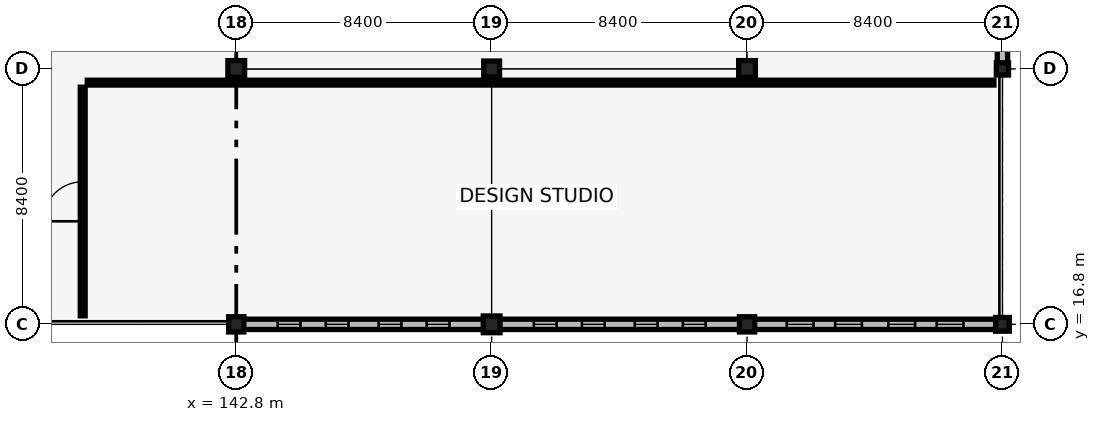
"""IFC4 building model, lengths in metres.
Left out: names, types, materials, properties, quantities, classifications, styles, units other than length and angle.
Written with IfcOpenShell. Run it as: python <this file> out.ifc"""

import sys

from ifc_helpers import new_model, si_unit, direction, frame, frame_2d, origin, origin_2d, place, context, subcontext, project, spatial, rectangle, extrude, element, fill, save


model = new_model("IFC4")
c1 = context("Model", 3, precision=1e-05, world=origin(), true_north=direction((0.0, 1.0)))
c2 = subcontext(c1, "Body", "Model", "MODEL_VIEW")
j1 = project(units=[si_unit("LENGTHUNIT", "METRE"), si_unit("PLANEANGLEUNIT", "RADIAN")], contexts=[c1])
p1 = place(None, origin())
s1 = spatial("IfcSite", under=j1, at=p1, CompositionType="ELEMENT")
p2 = place(p1, origin())
s2 = spatial("IfcBuilding", under=s1, at=p2, CompositionType="ELEMENT")
p3 = place(p2, frame((0.0, 0.0, 22.1)))
s3 = spatial("IfcBuildingStorey", under=s2, at=p3, CompositionType="ELEMENT", Elevation=22.1)
p4 = place(p3, frame((142.8, 16.8, 0.0), z_axis=(0.0, 0.0, 1.0), x_axis=(1.0, 0.0, 0.0)))
e1 = element("IfcColumn", 1, at=p4, inside=s3, PredefinedType="COLUMN", context=c2, shape_type="SweptSolid", body=[
    extrude(rectangle(XDim=0.5, YDim=0.5, at=origin_2d()), origin(), (0.0, 0.0, 1.0), 3.78),
])
for number, where, z_axis, x_axis in (
    (2, (142.8, 25.2, 0.0), (0.0, 0.0, 1.0), (1.0, 0.0, 0.0)),
    (3, (151.2, 16.8, 0.0), (0.0, 0.0, 1.0), (1.0, 0.0, 0.0)),
):
    element("IfcColumn", number, at=place(p3, frame(where, z_axis=z_axis, x_axis=x_axis)), inside=s3, PredefinedType="COLUMN", context=c2, shape_type="SweptSolid", body=[
        extrude(rectangle(XDim=0.55, YDim=0.55, at=origin_2d()), origin(), (0.0, 0.0, 1.0), 3.78),
    ])
p5 = place(p3, frame((151.2, 25.2, 0.0), z_axis=(0.0, 0.0, 1.0), x_axis=(1.0, 0.0, 0.0)))
e4 = element("IfcColumn", 4, at=p5, inside=s3, PredefinedType="COLUMN", context=c2, shape_type="SweptSolid", body=[
    extrude(rectangle(XDim=0.52, YDim=0.52, at=origin_2d()), origin(), (0.0, 0.0, 1.0), 3.78),
])
p6 = place(p3, frame((159.6, 16.8, 0.0), z_axis=(0.0, 0.0, 1.0), x_axis=(1.0, 0.0, 0.0)))
e5 = element("IfcColumn", 5, at=p6, inside=s3, PredefinedType="COLUMN", context=c2, shape_type="SweptSolid", body=[
    extrude(rectangle(XDim=0.5, YDim=0.5, at=origin_2d()), origin(), (0.0, 0.0, 1.0), 3.78),
])
p7 = place(p3, frame((159.6, 25.2, 0.0), z_axis=(0.0, 0.0, 1.0), x_axis=(1.0, 0.0, 0.0)))
e6 = element("IfcColumn", 6, at=p7, inside=s3, PredefinedType="COLUMN", context=c2, shape_type="SweptSolid", body=[
    extrude(rectangle(XDim=0.55, YDim=0.55, at=origin_2d()), origin(), (0.0, 0.0, 1.0), 3.78),
])
p8 = place(p3, frame((168.0, 16.8, 0.0), z_axis=(0.0, 0.0, 1.0), x_axis=(1.0, 0.0, 0.0)))
e7 = element("IfcColumn", 7, at=p8, inside=s3, PredefinedType="COLUMN", context=c2, shape_type="SweptSolid", body=[
    extrude(rectangle(XDim=0.45, YDim=0.45, at=origin_2d()), origin(), (0.0, 0.0, 1.0), 3.78),
])
p9 = place(p3, frame((168.0, 25.2, 0.0), z_axis=(0.0, 0.0, 1.0), x_axis=(1.0, 0.0, 0.0)))
e8 = element("IfcColumn", 8, at=p9, inside=s3, PredefinedType="COLUMN", context=c2, shape_type="SweptSolid", body=[
    extrude(rectangle(XDim=0.4, YDim=0.4, at=origin_2d()), origin(), (0.0, 0.0, 1.0), 3.78),
])
p10 = place(p3, frame((143.035, 16.8, 0.0), z_axis=(0.0, 0.0, 1.0), x_axis=(1.0, 0.0, 0.0)))
e9 = element("IfcWall", 9, at=p10, inside=s3, PredefinedType="SOLIDWALL", context=c2, shape_type="SweptSolid", body=[
    extrude(rectangle(XDim=7.905, YDim=0.34, at=frame_2d((3.953, 0.0))), origin(), (0.0, 0.0, 1.0), 3.18),
])
p11 = place(p10, frame((1.127, 0.0, 0.7)))
e10 = element("IfcOpeningElement", 10, at=p11, cuts=e9, PredefinedType="OPENING", context=c2, shape_type="SweptSolid", body=[
    extrude(rectangle(XDim=0.75, YDim=2.1, at=frame_2d((0.375, 1.05))), frame((0.0, 0.18, 0.0), z_axis=(0.0, -1.0, 0.0), x_axis=(1.0, 0.0, 0.0)), (0.0, 0.0, 1.0), 0.36),
])
p12 = place(p10, frame((2.708, 0.0, 0.7)))
e11 = element("IfcOpeningElement", 11, at=p12, cuts=e9, PredefinedType="OPENING", context=c2, shape_type="SweptSolid", body=[
    extrude(rectangle(XDim=0.75, YDim=2.1, at=frame_2d((0.375, 1.05))), frame((0.0, 0.18, 0.0), z_axis=(0.0, -1.0, 0.0), x_axis=(1.0, 0.0, 0.0)), (0.0, 0.0, 1.0), 0.36),
])
p13 = place(p10, frame((4.447, 0.0, 0.7)))
e12 = element("IfcOpeningElement", 12, at=p13, cuts=e9, PredefinedType="OPENING", context=c2, shape_type="SweptSolid", body=[
    extrude(rectangle(XDim=0.75, YDim=2.1, at=frame_2d((0.375, 1.05))), frame((0.0, 0.18, 0.0), z_axis=(0.0, -1.0, 0.0), x_axis=(1.0, 0.0, 0.0)), (0.0, 0.0, 1.0), 0.36),
])
p14 = place(p10, frame((6.028, 0.0, 0.7)))
e13 = element("IfcOpeningElement", 13, at=p14, cuts=e9, PredefinedType="OPENING", context=c2, shape_type="SweptSolid", body=[
    extrude(rectangle(XDim=0.75, YDim=2.1, at=frame_2d((0.375, 1.05))), frame((0.0, 0.18, 0.0), z_axis=(0.0, -1.0, 0.0), x_axis=(1.0, 0.0, 0.0)), (0.0, 0.0, 1.0), 0.36),
])
p15 = place(p3, frame((151.46, 16.8, 0.0), z_axis=(0.0, 0.0, 1.0), x_axis=(1.0, 0.0, 0.0)))
e14 = element("IfcWall", 14, at=p15, inside=s3, PredefinedType="SOLIDWALL", context=c2, shape_type="SweptSolid", body=[
    extrude(rectangle(XDim=7.905, YDim=0.34, at=frame_2d((3.953, 0.0))), origin(), (0.0, 0.0, 1.0), 3.18),
])
p16 = place(p15, frame((1.127, 0.0, 0.7)))
e15 = element("IfcOpeningElement", 15, at=p16, cuts=e14, PredefinedType="OPENING", context=c2, shape_type="SweptSolid", body=[
    extrude(rectangle(XDim=0.75, YDim=2.1, at=frame_2d((0.375, 1.05))), frame((0.0, 0.18, 0.0), z_axis=(0.0, -1.0, 0.0), x_axis=(1.0, 0.0, 0.0)), (0.0, 0.0, 1.0), 0.36),
])
p17 = place(p15, frame((2.708, 0.0, 0.7)))
e16 = element("IfcOpeningElement", 16, at=p17, cuts=e14, PredefinedType="OPENING", context=c2, shape_type="SweptSolid", body=[
    extrude(rectangle(XDim=0.75, YDim=2.1, at=frame_2d((0.375, 1.05))), frame((0.0, 0.18, 0.0), z_axis=(0.0, -1.0, 0.0), x_axis=(1.0, 0.0, 0.0)), (0.0, 0.0, 1.0), 0.36),
])
p18 = place(p15, frame((4.447, 0.0, 0.7)))
e17 = element("IfcOpeningElement", 17, at=p18, cuts=e14, PredefinedType="OPENING", context=c2, shape_type="SweptSolid", body=[
    extrude(rectangle(XDim=0.75, YDim=2.1, at=frame_2d((0.375, 1.05))), frame((0.0, 0.18, 0.0), z_axis=(0.0, -1.0, 0.0), x_axis=(1.0, 0.0, 0.0)), (0.0, 0.0, 1.0), 0.36),
])
p19 = place(p15, frame((6.028, 0.0, 0.7)))
e18 = element("IfcOpeningElement", 18, at=p19, cuts=e14, PredefinedType="OPENING", context=c2, shape_type="SweptSolid", body=[
    extrude(rectangle(XDim=0.75, YDim=2.1, at=frame_2d((0.375, 1.05))), frame((0.0, 0.18, 0.0), z_axis=(0.0, -1.0, 0.0), x_axis=(1.0, 0.0, 0.0)), (0.0, 0.0, 1.0), 0.36),
])
p20 = place(p3, frame((159.835, 16.8, 0.0), z_axis=(0.0, 0.0, 1.0), x_axis=(1.0, 0.0, 0.0)))
e19 = element("IfcWall", 19, at=p20, inside=s3, PredefinedType="SOLIDWALL", context=c2, shape_type="SweptSolid", body=[
    extrude(rectangle(XDim=7.955, YDim=0.34, at=frame_2d((3.978, 0.0))), origin(), (0.0, 0.0, 1.0), 3.78),
])
p21 = place(p20, frame((1.072, 0.0, 0.75)))
e20 = element("IfcOpeningElement", 20, at=p21, cuts=e19, PredefinedType="OPENING", context=c2, shape_type="SweptSolid", body=[
    extrude(rectangle(XDim=0.88, YDim=2.45, at=frame_2d((0.44, 1.225))), frame((0.0, 0.18, 0.0), z_axis=(0.0, -1.0, 0.0), x_axis=(1.0, 0.0, 0.0)), (0.0, 0.0, 1.0), 0.36),
])
p22 = place(p20, frame((2.662, 0.0, 0.75)))
e21 = element("IfcOpeningElement", 21, at=p22, cuts=e19, PredefinedType="OPENING", context=c2, shape_type="SweptSolid", body=[
    extrude(rectangle(XDim=0.88, YDim=2.45, at=frame_2d((0.44, 1.225))), frame((0.0, 0.18, 0.0), z_axis=(0.0, -1.0, 0.0), x_axis=(1.0, 0.0, 0.0)), (0.0, 0.0, 1.0), 0.36),
])
p23 = place(p20, frame((4.413, 0.0, 0.75)))
e22 = element("IfcOpeningElement", 22, at=p23, cuts=e19, PredefinedType="OPENING", context=c2, shape_type="SweptSolid", body=[
    extrude(rectangle(XDim=0.88, YDim=2.45, at=frame_2d((0.44, 1.225))), frame((0.0, 0.18, 0.0), z_axis=(0.0, -1.0, 0.0), x_axis=(1.0, 0.0, 0.0)), (0.0, 0.0, 1.0), 0.36),
])
p24 = place(p20, frame((6.004, 0.0, 0.75)))
e23 = element("IfcOpeningElement", 23, at=p24, cuts=e19, PredefinedType="OPENING", context=c2, shape_type="SweptSolid", body=[
    extrude(rectangle(XDim=0.88, YDim=2.45, at=frame_2d((0.44, 1.225))), frame((0.0, 0.18, 0.0), z_axis=(0.0, -1.0, 0.0), x_axis=(1.0, 0.0, 0.0)), (0.0, 0.0, 1.0), 0.36),
])
p25 = place(p3, frame((168.0, 25.385, 0.0), z_axis=(0.0, 0.0, 1.0), x_axis=(0.0, 1.0, 0.0)))
e24 = element("IfcWall", 24, at=p25, inside=s3, PredefinedType="SOLIDWALL", context=c2, shape_type="SweptSolid", body=[
    extrude(rectangle(XDim=8.005, YDim=0.34, at=frame_2d((4.002, 0.0))), origin(), (0.0, 0.0, 1.0), 3.78),
])
p26 = place(p25, frame((1.041, 0.0, 0.75)))
e25 = element("IfcOpeningElement", 25, at=p26, cuts=e24, PredefinedType="OPENING", context=c2, shape_type="SweptSolid", body=[
    extrude(rectangle(XDim=0.96, YDim=2.75, at=frame_2d((0.48, 1.375))), frame((0.0, 0.18, 0.0), z_axis=(0.0, -1.0, 0.0), x_axis=(1.0, 0.0, 0.0)), (0.0, 0.0, 1.0), 0.36),
])
p27 = place(p25, frame((2.642, 0.0, 0.75)))
e26 = element("IfcOpeningElement", 26, at=p27, cuts=e24, PredefinedType="OPENING", context=c2, shape_type="SweptSolid", body=[
    extrude(rectangle(XDim=0.96, YDim=2.75, at=frame_2d((0.48, 1.375))), frame((0.0, 0.18, 0.0), z_axis=(0.0, -1.0, 0.0), x_axis=(1.0, 0.0, 0.0)), (0.0, 0.0, 1.0), 0.36),
])
p28 = place(p25, frame((4.403, 0.0, 0.75)))
e27 = element("IfcOpeningElement", 27, at=p28, cuts=e24, PredefinedType="OPENING", context=c2, shape_type="SweptSolid", body=[
    extrude(rectangle(XDim=0.96, YDim=2.75, at=frame_2d((0.48, 1.375))), frame((0.0, 0.18, 0.0), z_axis=(0.0, -1.0, 0.0), x_axis=(1.0, 0.0, 0.0)), (0.0, 0.0, 1.0), 0.36),
])
p29 = place(p25, frame((6.004, 0.0, 0.75)))
e28 = element("IfcOpeningElement", 28, at=p29, cuts=e24, PredefinedType="OPENING", context=c2, shape_type="SweptSolid", body=[
    extrude(rectangle(XDim=0.96, YDim=2.75, at=frame_2d((0.48, 1.375))), frame((0.0, 0.18, 0.0), z_axis=(0.0, -1.0, 0.0), x_axis=(1.0, 0.0, 0.0)), (0.0, 0.0, 1.0), 0.36),
])
p30 = place(p3, frame((137.75, 17.08, 0.0), z_axis=(0.0, 0.0, 1.0), x_axis=(0.0, 1.0, 0.0)))
e29 = element("IfcWall", 29, at=p30, inside=s3, PredefinedType="PARTITIONING", context=c2, shape_type="SweptSolid", body=[
    extrude(rectangle(XDim=7.52, YDim=0.16, at=frame_2d((3.76, 0.0))), origin(), (0.0, 0.0, 1.0), 3.18),
])
p31 = place(p30, frame((3.11, 0.0, 0.0)))
e30 = element("IfcOpeningElement", 30, at=p31, cuts=e29, PredefinedType="OPENING", context=c2, shape_type="SweptSolid", body=[
    extrude(rectangle(XDim=1.3, YDim=2.2, at=frame_2d((0.65, 1.1))), frame((0.0, 0.09, 0.0), z_axis=(0.0, -1.0, 0.0), x_axis=(1.0, 0.0, 0.0)), (0.0, 0.0, 1.0), 0.18),
])
p32 = place(p3, frame((137.9, 24.75, 0.0), z_axis=(0.0, 0.0, 1.0), x_axis=(1.0, 0.0, 0.0)))
e31 = element("IfcWall", 31, at=p32, inside=s3, PredefinedType="PARTITIONING", context=c2, shape_type="SweptSolid", body=[
    extrude(rectangle(XDim=29.82, YDim=0.16, at=frame_2d((14.91, 0.0))), origin(), (0.0, 0.0, 1.0), 3.13),
])
p33 = place(p11, origin())
e32 = element("IfcWindow", 32, at=p33, inside=s3, PartitioningType="DOUBLE_PANEL_VERTICAL", PredefinedType="WINDOW", context=c2, shape_type="SweptSolid", body=[
    extrude(rectangle(XDim=0.75, YDim=2.1, at=frame_2d((0.375, 1.05))), frame((0.0, 0.03, 0.0), z_axis=(0.0, -1.0, 0.0), x_axis=(1.0, 0.0, 0.0)), (0.0, 0.0, 1.0), 0.06),
])
fill(e10, e32)
p34 = place(p12, origin())
e33 = element("IfcWindow", 33, at=p34, inside=s3, PartitioningType="DOUBLE_PANEL_VERTICAL", PredefinedType="WINDOW", context=c2, shape_type="SweptSolid", body=[
    extrude(rectangle(XDim=0.75, YDim=2.1, at=frame_2d((0.375, 1.05))), frame((0.0, 0.03, 0.0), z_axis=(0.0, -1.0, 0.0), x_axis=(1.0, 0.0, 0.0)), (0.0, 0.0, 1.0), 0.06),
])
fill(e11, e33)
p35 = place(p13, origin())
e34 = element("IfcWindow", 34, at=p35, inside=s3, PartitioningType="DOUBLE_PANEL_VERTICAL", PredefinedType="WINDOW", context=c2, shape_type="SweptSolid", body=[
    extrude(rectangle(XDim=0.75, YDim=2.1, at=frame_2d((0.375, 1.05))), frame((0.0, 0.03, 0.0), z_axis=(0.0, -1.0, 0.0), x_axis=(1.0, 0.0, 0.0)), (0.0, 0.0, 1.0), 0.06),
])
fill(e12, e34)
p36 = place(p14, origin())
e35 = element("IfcWindow", 35, at=p36, inside=s3, PartitioningType="DOUBLE_PANEL_VERTICAL", PredefinedType="WINDOW", context=c2, shape_type="SweptSolid", body=[
    extrude(rectangle(XDim=0.75, YDim=2.1, at=frame_2d((0.375, 1.05))), frame((0.0, 0.03, 0.0), z_axis=(0.0, -1.0, 0.0), x_axis=(1.0, 0.0, 0.0)), (0.0, 0.0, 1.0), 0.06),
])
fill(e13, e35)
p37 = place(p16, origin())
e36 = element("IfcWindow", 36, at=p37, inside=s3, PartitioningType="DOUBLE_PANEL_VERTICAL", PredefinedType="WINDOW", context=c2, shape_type="SweptSolid", body=[
    extrude(rectangle(XDim=0.75, YDim=2.1, at=frame_2d((0.375, 1.05))), frame((0.0, 0.03, 0.0), z_axis=(0.0, -1.0, 0.0), x_axis=(1.0, 0.0, 0.0)), (0.0, 0.0, 1.0), 0.06),
])
fill(e15, e36)
p38 = place(p17, origin())
e37 = element("IfcWindow", 37, at=p38, inside=s3, PartitioningType="DOUBLE_PANEL_VERTICAL", PredefinedType="WINDOW", context=c2, shape_type="SweptSolid", body=[
    extrude(rectangle(XDim=0.75, YDim=2.1, at=frame_2d((0.375, 1.05))), frame((0.0, 0.03, 0.0), z_axis=(0.0, -1.0, 0.0), x_axis=(1.0, 0.0, 0.0)), (0.0, 0.0, 1.0), 0.06),
])
fill(e16, e37)
p39 = place(p18, origin())
e38 = element("IfcWindow", 38, at=p39, inside=s3, PartitioningType="DOUBLE_PANEL_VERTICAL", PredefinedType="WINDOW", context=c2, shape_type="SweptSolid", body=[
    extrude(rectangle(XDim=0.75, YDim=2.1, at=frame_2d((0.375, 1.05))), frame((0.0, 0.03, 0.0), z_axis=(0.0, -1.0, 0.0), x_axis=(1.0, 0.0, 0.0)), (0.0, 0.0, 1.0), 0.06),
])
fill(e17, e38)
p40 = place(p19, origin())
e39 = element("IfcWindow", 39, at=p40, inside=s3, PartitioningType="DOUBLE_PANEL_VERTICAL", PredefinedType="WINDOW", context=c2, shape_type="SweptSolid", body=[
    extrude(rectangle(XDim=0.75, YDim=2.1, at=frame_2d((0.375, 1.05))), frame((0.0, 0.03, 0.0), z_axis=(0.0, -1.0, 0.0), x_axis=(1.0, 0.0, 0.0)), (0.0, 0.0, 1.0), 0.06),
])
fill(e18, e39)
p41 = place(p21, origin())
e40 = element("IfcWindow", 40, at=p41, inside=s3, PartitioningType="DOUBLE_PANEL_VERTICAL", PredefinedType="WINDOW", context=c2, shape_type="SweptSolid", body=[
    extrude(rectangle(XDim=0.88, YDim=2.45, at=frame_2d((0.44, 1.225))), frame((0.0, 0.03, 0.0), z_axis=(0.0, -1.0, 0.0), x_axis=(1.0, 0.0, 0.0)), (0.0, 0.0, 1.0), 0.06),
])
fill(e20, e40)
p42 = place(p22, origin())
e41 = element("IfcWindow", 41, at=p42, inside=s3, PartitioningType="DOUBLE_PANEL_VERTICAL", PredefinedType="WINDOW", context=c2, shape_type="SweptSolid", body=[
    extrude(rectangle(XDim=0.88, YDim=2.45, at=frame_2d((0.44, 1.225))), frame((0.0, 0.03, 0.0), z_axis=(0.0, -1.0, 0.0), x_axis=(1.0, 0.0, 0.0)), (0.0, 0.0, 1.0), 0.06),
])
fill(e21, e41)
p43 = place(p23, origin())
e42 = element("IfcWindow", 42, at=p43, inside=s3, PartitioningType="DOUBLE_PANEL_VERTICAL", PredefinedType="WINDOW", context=c2, shape_type="SweptSolid", body=[
    extrude(rectangle(XDim=0.88, YDim=2.45, at=frame_2d((0.44, 1.225))), frame((0.0, 0.03, 0.0), z_axis=(0.0, -1.0, 0.0), x_axis=(1.0, 0.0, 0.0)), (0.0, 0.0, 1.0), 0.06),
])
fill(e22, e42)
p44 = place(p24, origin())
e43 = element("IfcWindow", 43, at=p44, inside=s3, PartitioningType="DOUBLE_PANEL_VERTICAL", PredefinedType="WINDOW", context=c2, shape_type="SweptSolid", body=[
    extrude(rectangle(XDim=0.88, YDim=2.45, at=frame_2d((0.44, 1.225))), frame((0.0, 0.03, 0.0), z_axis=(0.0, -1.0, 0.0), x_axis=(1.0, 0.0, 0.0)), (0.0, 0.0, 1.0), 0.06),
])
fill(e23, e43)
p45 = place(p31, origin())
e44 = element("IfcDoor", 44, at=p45, inside=s3, OperationType="SINGLE_SWING_LEFT", PredefinedType="DOOR", context=c2, shape_type="SweptSolid", body=[
    extrude(rectangle(XDim=1.3, YDim=2.2, at=frame_2d((0.65, 1.1))), frame((0.0, 0.025, 0.0), z_axis=(0.0, -1.0, 0.0), x_axis=(1.0, 0.0, 0.0)), (0.0, 0.0, 1.0), 0.05),
])
fill(e30, e44)
save(model, sys.argv[1])
